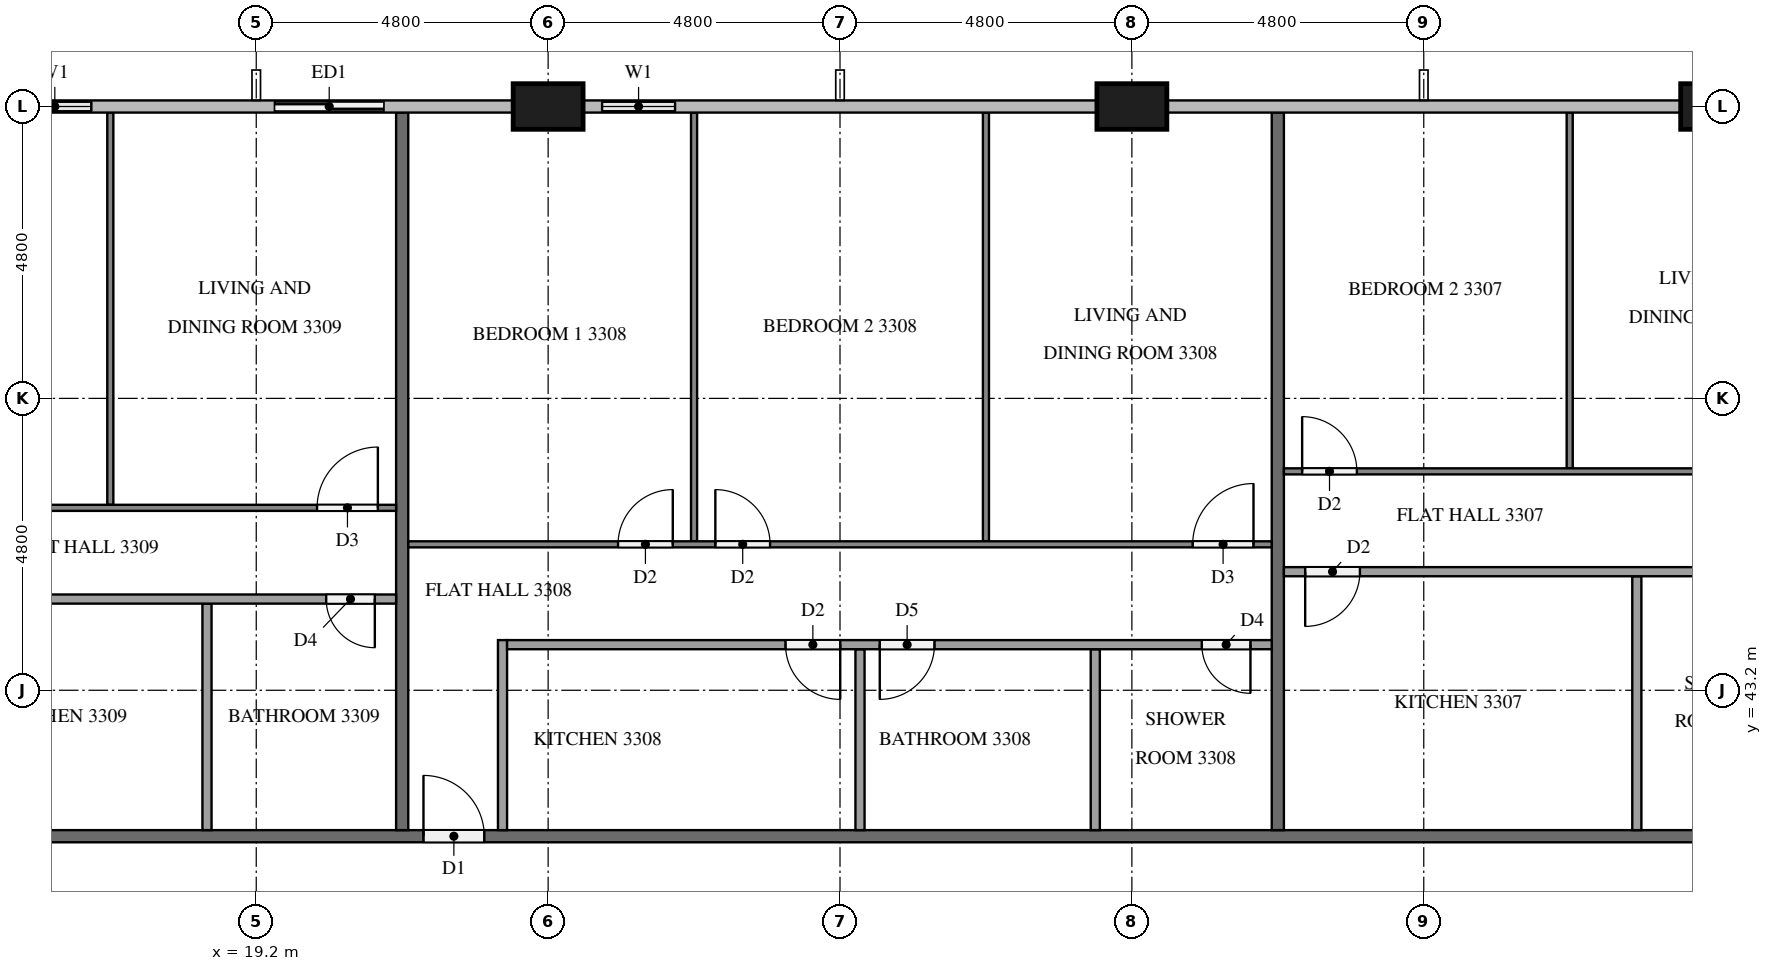
"""IFC4 building model, lengths in metres.
Left out: names, types, materials, properties, quantities, classifications, styles, units other than length and angle.
Written with IfcOpenShell. Run it as: python <this file> out.ifc"""

import sys

from ifc_helpers import new_model, si_unit, direction, frame, frame_2d, origin, origin_2d, place, context, subcontext, project, spatial, rectangle, extrude, element, fill, save


model = new_model("IFC4")
c1 = context("Model", 3, precision=1e-05, world=origin(), true_north=direction((0.0, 1.0)))
c2 = subcontext(c1, "Body", "Model", "MODEL_VIEW")
j1 = project(units=[si_unit("LENGTHUNIT", "METRE"), si_unit("PLANEANGLEUNIT", "RADIAN")], contexts=[c1])
p1 = place(None, origin())
s1 = spatial("IfcSite", under=j1, at=p1, CompositionType="ELEMENT")
p2 = place(p1, origin())
s2 = spatial("IfcBuilding", under=s1, at=p2, CompositionType="ELEMENT")
p3 = place(p2, frame((0.0, 0.0, 129.6)))
s3 = spatial("IfcBuildingStorey", under=s2, at=p3, CompositionType="ELEMENT", Elevation=129.6)
for number, where, z_axis, x_axis in (
    (1, (43.2, 52.8, 0.0), (0.0, 0.0, 1.0), (1.0, 0.0, 0.0)),
    (2, (33.6, 52.8, 0.0), (0.0, 0.0, 1.0), (1.0, 0.0, 0.0)),
    (3, (24.0, 52.8, 0.0), (0.0, 0.0, 1.0), (1.0, 0.0, 0.0)),
):
    element("IfcColumn", number, at=place(p3, frame(where, z_axis=z_axis, x_axis=x_axis)), inside=s3, PredefinedType="COLUMN", context=c2, shape_type="SweptSolid", body=[
        extrude(rectangle(XDim=1.15, YDim=0.75, at=origin_2d()), origin(), (0.0, 0.0, 1.0), 3.2),
    ])
p4 = place(p3, frame((26.4, 52.8, 0.0), z_axis=(0.0, 0.0, 1.0), x_axis=(-1.0, 0.0, 0.0)))
e4 = element("IfcWall", 4, at=p4, inside=s3, PredefinedType="SOLIDWALL", context=c2, shape_type="SweptSolid", body=[
    extrude(rectangle(XDim=1.825, YDim=0.15, at=frame_2d((0.913, 0.0))), origin(), (0.0, 0.0, 1.0), 3.2),
])
p5 = place(p4, frame((0.312, 0.0, 0.9)))
e5 = element("IfcOpeningElement", 5, at=p5, cuts=e4, PredefinedType="OPENING", context=c2, shape_type="SweptSolid", body=[
    extrude(rectangle(XDim=1.2, YDim=1.4, at=frame_2d((0.6, 0.7))), frame((0.0, 0.085, 0.0), z_axis=(0.0, -1.0, 0.0), x_axis=(1.0, 0.0, 0.0)), (0.0, 0.0, 1.0), 0.17),
])
p6 = place(p3, frame((21.6, 52.8, 0.0), z_axis=(0.0, 0.0, 1.0), x_axis=(-1.0, 0.0, 0.0)))
e6 = element("IfcWall", 6, at=p6, inside=s3, PredefinedType="SOLIDWALL", context=c2, shape_type="SweptSolid", body=[
    extrude(rectangle(XDim=2.4, YDim=0.15, at=frame_2d((1.2, 0.0))), origin(), (0.0, 0.0, 1.0), 3.2),
])
p7 = place(p6, frame((0.3, 0.0, 0.0)))
e7 = element("IfcOpeningElement", 7, at=p7, cuts=e6, PredefinedType="OPENING", context=c2, shape_type="SweptSolid", body=[
    extrude(rectangle(XDim=1.8, YDim=2.4, at=frame_2d((0.9, 1.2))), frame((0.0, 0.085, 0.0), z_axis=(0.0, -1.0, 0.0), x_axis=(1.0, 0.0, 0.0)), (0.0, 0.0, 1.0), 0.17),
])
p8 = place(p3, frame((16.8, 52.8, 0.0), z_axis=(0.0, 0.0, 1.0), x_axis=(-1.0, 0.0, 0.0)))
e8 = element("IfcWall", 8, at=p8, inside=s3, PredefinedType="SOLIDWALL", context=c2, shape_type="SweptSolid", body=[
    extrude(rectangle(XDim=1.825, YDim=0.15, at=frame_2d((0.913, 0.0))), origin(), (0.0, 0.0, 1.0), 3.2),
])
p9 = place(p8, frame((0.312, 0.0, 0.9)))
e9 = element("IfcOpeningElement", 9, at=p9, cuts=e8, PredefinedType="OPENING", context=c2, shape_type="SweptSolid", body=[
    extrude(rectangle(XDim=1.2, YDim=1.4, at=frame_2d((0.6, 0.7))), frame((0.0, 0.085, 0.0), z_axis=(0.0, -1.0, 0.0), x_axis=(1.0, 0.0, 0.0)), (0.0, 0.0, 1.0), 0.17),
])
p10 = place(p3, frame((11.9, 40.8, 0.0), z_axis=(0.0, 0.0, 1.0), x_axis=(1.0, 0.0, 0.0)))
e10 = element("IfcWall", 10, at=p10, inside=s3, PredefinedType="PARTITIONING", context=c2, shape_type="SweptSolid", body=[
    extrude(rectangle(XDim=38.6, YDim=0.2, at=frame_2d((19.3, 0.0))), origin(), (0.0, 0.0, 1.0), 3.2),
])
p11 = place(p10, frame((37.15, 0.0, 0.0)))
e11 = element("IfcOpeningElement", 11, at=p11, cuts=e10, PredefinedType="OPENING", context=c2, shape_type="SweptSolid", body=[
    extrude(rectangle(XDim=1.0, YDim=2.1, at=frame_2d((0.5, 1.05))), frame((0.0, 0.11, 0.0), z_axis=(0.0, -1.0, 0.0), x_axis=(1.0, 0.0, 0.0)), (0.0, 0.0, 1.0), 0.22),
])
p12 = place(p10, frame((10.05, 0.0, 0.0)))
e12 = element("IfcOpeningElement", 12, at=p12, cuts=e10, PredefinedType="OPENING", context=c2, shape_type="SweptSolid", body=[
    extrude(rectangle(XDim=1.0, YDim=2.1, at=frame_2d((0.5, 1.05))), frame((0.0, 0.11, 0.0), z_axis=(0.0, -1.0, 0.0), x_axis=(1.0, 0.0, 0.0)), (0.0, 0.0, 1.0), 0.22),
])
p13 = place(p10, frame((0.45, 0.0, 0.0)))
e13 = element("IfcOpeningElement", 13, at=p13, cuts=e10, PredefinedType="OPENING", context=c2, shape_type="SweptSolid", body=[
    extrude(rectangle(XDim=1.0, YDim=2.1, at=frame_2d((0.5, 1.05))), frame((0.0, 0.11, 0.0), z_axis=(0.0, -1.0, 0.0), x_axis=(1.0, 0.0, 0.0)), (0.0, 0.0, 1.0), 0.22),
])
for number, where, z_axis, x_axis in (
    (14, (36.0, 52.7, 0.0), (0.0, 0.0, 1.0), (0.0, -1.0, 0.0)),
    (15, (21.6, 52.7, 0.0), (0.0, 0.0, 1.0), (0.0, -1.0, 0.0)),
):
    element("IfcWall", number, at=place(p3, frame(where, z_axis=z_axis, x_axis=x_axis)), inside=s3, PredefinedType="PARTITIONING", context=c2, shape_type="SweptSolid", body=[
        extrude(rectangle(XDim=11.8, YDim=0.2, at=frame_2d((5.9, 0.0))), origin(), (0.0, 0.0, 1.0), 3.2),
    ])
p14 = place(p3, frame((40.8, 46.85, 0.0), z_axis=(0.0, 0.0, 1.0), x_axis=(0.0, 1.0, 0.0)))
e16 = element("IfcWall", 16, at=p14, inside=s3, PredefinedType="PARTITIONING", context=c2, shape_type="SweptSolid", body=[
    extrude(rectangle(XDim=5.85, YDim=0.1, at=frame_2d((2.925, 0.0))), origin(), (0.0, 0.0, 1.0), 3.2),
])
p15 = place(p3, frame((36.1, 46.8, 0.0), z_axis=(0.0, 0.0, 1.0), x_axis=(1.0, 0.0, 0.0)))
e17 = element("IfcWall", 17, at=p15, inside=s3, PredefinedType="PARTITIONING", context=c2, shape_type="SweptSolid", body=[
    extrude(rectangle(XDim=14.2, YDim=0.1, at=frame_2d((7.1, 0.0))), origin(), (0.0, 0.0, 1.0), 3.2),
])
p16 = place(p15, frame((9.85, 0.0, 0.0)))
e18 = element("IfcOpeningElement", 18, at=p16, cuts=e17, PredefinedType="OPENING", context=c2, shape_type="SweptSolid", body=[
    extrude(rectangle(XDim=0.9, YDim=2.1, at=frame_2d((0.45, 1.05))), frame((0.0, 0.06, 0.0), z_axis=(0.0, -1.0, 0.0), x_axis=(1.0, 0.0, 0.0)), (0.0, 0.0, 1.0), 0.12),
])
p17 = place(p15, frame((8.15, 0.0, 0.0)))
e19 = element("IfcOpeningElement", 19, at=p17, cuts=e17, PredefinedType="OPENING", context=c2, shape_type="SweptSolid", body=[
    extrude(rectangle(XDim=1.0, YDim=2.1, at=frame_2d((0.5, 1.05))), frame((0.0, 0.06, 0.0), z_axis=(0.0, -1.0, 0.0), x_axis=(1.0, 0.0, 0.0)), (0.0, 0.0, 1.0), 0.12),
])
p18 = place(p15, frame((0.3, 0.0, 0.0)))
e20 = element("IfcOpeningElement", 20, at=p18, cuts=e17, PredefinedType="OPENING", context=c2, shape_type="SweptSolid", body=[
    extrude(rectangle(XDim=0.9, YDim=2.1, at=frame_2d((0.45, 1.05))), frame((0.0, 0.06, 0.0), z_axis=(0.0, -1.0, 0.0), x_axis=(1.0, 0.0, 0.0)), (0.0, 0.0, 1.0), 0.12),
])
p19 = place(p3, frame((41.904, 40.9, 0.0), z_axis=(0.0, 0.0, 1.0), x_axis=(0.0, 1.0, 0.0)))
e21 = element("IfcWall", 21, at=p19, inside=s3, PredefinedType="PARTITIONING", context=c2, shape_type="SweptSolid", body=[
    extrude(rectangle(XDim=4.175, YDim=0.15, at=frame_2d((2.087, 0.0))), origin(), (0.0, 0.0, 1.0), 3.2),
])
p20 = place(p3, frame((48.675, 45.15, 0.0), z_axis=(0.0, 0.0, 1.0), x_axis=(-1.0, 0.0, 0.0)))
e22 = element("IfcWall", 22, at=p20, inside=s3, PredefinedType="PARTITIONING", context=c2, shape_type="SweptSolid", body=[
    extrude(rectangle(XDim=12.575, YDim=0.15, at=frame_2d((6.288, 0.0))), origin(), (0.0, 0.0, 1.0), 3.2),
])
p21 = place(p20, frame((2.644, 0.0, 0.0)))
e23 = element("IfcOpeningElement", 23, at=p21, cuts=e22, PredefinedType="OPENING", context=c2, shape_type="SweptSolid", body=[
    extrude(rectangle(XDim=0.9, YDim=2.1, at=frame_2d((0.45, 1.05))), frame((0.0, 0.085, 0.0), z_axis=(0.0, -1.0, 0.0), x_axis=(1.0, 0.0, 0.0)), (0.0, 0.0, 1.0), 0.17),
])
p22 = place(p20, frame((4.194, 0.0, 0.0)))
e24 = element("IfcOpeningElement", 24, at=p22, cuts=e22, PredefinedType="OPENING", context=c2, shape_type="SweptSolid", body=[
    extrude(rectangle(XDim=0.8, YDim=2.1, at=frame_2d((0.4, 1.05))), frame((0.0, 0.085, 0.0), z_axis=(0.0, -1.0, 0.0), x_axis=(1.0, 0.0, 0.0)), (0.0, 0.0, 1.0), 0.17),
])
p23 = place(p20, frame((11.325, 0.0, 0.0)))
e25 = element("IfcOpeningElement", 25, at=p23, cuts=e22, PredefinedType="OPENING", context=c2, shape_type="SweptSolid", body=[
    extrude(rectangle(XDim=0.9, YDim=2.1, at=frame_2d((0.45, 1.05))), frame((0.0, 0.085, 0.0), z_axis=(0.0, -1.0, 0.0), x_axis=(1.0, 0.0, 0.0)), (0.0, 0.0, 1.0), 0.17),
])
for number, where, z_axis, x_axis in (
    (26, (26.4, 45.65, 0.0), (0.0, 0.0, 1.0), (0.0, 1.0, 0.0)),
    (27, (31.2, 45.65, 0.0), (0.0, 0.0, 1.0), (0.0, 1.0, 0.0)),
):
    element("IfcWall", number, at=place(p3, frame(where, z_axis=z_axis, x_axis=x_axis)), inside=s3, PredefinedType="PARTITIONING", context=c2, shape_type="SweptSolid", body=[
        extrude(rectangle(XDim=7.05, YDim=0.1, at=frame_2d((3.525, 0.0))), origin(), (0.0, 0.0, 1.0), 3.2),
    ])
p24 = place(p3, frame((21.7, 45.6, 0.0), z_axis=(0.0, 0.0, 1.0), x_axis=(1.0, 0.0, 0.0)))
e28 = element("IfcWall", 28, at=p24, inside=s3, PredefinedType="PARTITIONING", context=c2, shape_type="SweptSolid", body=[
    extrude(rectangle(XDim=14.2, YDim=0.1, at=frame_2d((7.1, 0.0))), origin(), (0.0, 0.0, 1.0), 3.2),
])
p25 = place(p24, frame((3.45, 0.0, 0.0)))
e29 = element("IfcOpeningElement", 29, at=p25, cuts=e28, PredefinedType="OPENING", context=c2, shape_type="SweptSolid", body=[
    extrude(rectangle(XDim=0.9, YDim=2.1, at=frame_2d((0.45, 1.05))), frame((0.0, 0.06, 0.0), z_axis=(0.0, -1.0, 0.0), x_axis=(1.0, 0.0, 0.0)), (0.0, 0.0, 1.0), 0.12),
])
p26 = place(p24, frame((5.05, 0.0, 0.0)))
e30 = element("IfcOpeningElement", 30, at=p26, cuts=e28, PredefinedType="OPENING", context=c2, shape_type="SweptSolid", body=[
    extrude(rectangle(XDim=0.9, YDim=2.1, at=frame_2d((0.45, 1.05))), frame((0.0, 0.06, 0.0), z_axis=(0.0, -1.0, 0.0), x_axis=(1.0, 0.0, 0.0)), (0.0, 0.0, 1.0), 0.12),
])
p27 = place(p24, frame((12.9, 0.0, 0.0)))
e31 = element("IfcOpeningElement", 31, at=p27, cuts=e28, PredefinedType="OPENING", context=c2, shape_type="SweptSolid", body=[
    extrude(rectangle(XDim=1.0, YDim=2.1, at=frame_2d((0.5, 1.05))), frame((0.0, 0.06, 0.0), z_axis=(0.0, -1.0, 0.0), x_axis=(1.0, 0.0, 0.0)), (0.0, 0.0, 1.0), 0.12),
])
for number, where, z_axis, x_axis in (
    (32, (29.129, 40.9, 0.0), (0.0, 0.0, 1.0), (0.0, 1.0, 0.0)),
    (33, (32.998, 40.9, 0.0), (0.0, 0.0, 1.0), (0.0, 1.0, 0.0)),
):
    element("IfcWall", number, at=place(p3, frame(where, z_axis=z_axis, x_axis=x_axis)), inside=s3, PredefinedType="PARTITIONING", context=c2, shape_type="SweptSolid", body=[
        extrude(rectangle(XDim=2.975, YDim=0.15, at=frame_2d((1.488, 0.0))), origin(), (0.0, 0.0, 1.0), 3.2),
    ])
p28 = place(p3, frame((23.25, 40.9, 0.0), z_axis=(0.0, 0.0, 1.0), x_axis=(0.0, 1.0, 0.0)))
e34 = element("IfcWall", 34, at=p28, inside=s3, PredefinedType="PARTITIONING", context=c2, shape_type="SweptSolid", body=[
    extrude(rectangle(XDim=3.125, YDim=0.15, at=frame_2d((1.562, 0.0))), origin(), (0.0, 0.0, 1.0), 3.2),
])
p29 = place(p3, frame((35.9, 43.95, 0.0), z_axis=(0.0, 0.0, 1.0), x_axis=(-1.0, 0.0, 0.0)))
e35 = element("IfcWall", 35, at=p29, inside=s3, PredefinedType="PARTITIONING", context=c2, shape_type="SweptSolid", body=[
    extrude(rectangle(XDim=12.575, YDim=0.15, at=frame_2d((6.288, 0.0))), origin(), (0.0, 0.0, 1.0), 3.2),
])
p30 = place(p29, frame((7.096, 0.0, 0.0)))
e36 = element("IfcOpeningElement", 36, at=p30, cuts=e35, PredefinedType="OPENING", context=c2, shape_type="SweptSolid", body=[
    extrude(rectangle(XDim=0.9, YDim=2.1, at=frame_2d((0.45, 1.05))), frame((0.0, 0.085, 0.0), z_axis=(0.0, -1.0, 0.0), x_axis=(1.0, 0.0, 0.0)), (0.0, 0.0, 1.0), 0.17),
])
p31 = place(p29, frame((5.546, 0.0, 0.0)))
e37 = element("IfcOpeningElement", 37, at=p31, cuts=e35, PredefinedType="OPENING", context=c2, shape_type="SweptSolid", body=[
    extrude(rectangle(XDim=0.9, YDim=2.1, at=frame_2d((0.45, 1.05))), frame((0.0, 0.085, 0.0), z_axis=(0.0, -1.0, 0.0), x_axis=(1.0, 0.0, 0.0)), (0.0, 0.0, 1.0), 0.17),
])
p32 = place(p29, frame((0.35, 0.0, 0.0)))
e38 = element("IfcOpeningElement", 38, at=p32, cuts=e35, PredefinedType="OPENING", context=c2, shape_type="SweptSolid", body=[
    extrude(rectangle(XDim=0.8, YDim=2.1, at=frame_2d((0.4, 1.05))), frame((0.0, 0.085, 0.0), z_axis=(0.0, -1.0, 0.0), x_axis=(1.0, 0.0, 0.0)), (0.0, 0.0, 1.0), 0.17),
])
p33 = place(p3, frame((16.8, 46.25, 0.0), z_axis=(0.0, 0.0, 1.0), x_axis=(0.0, 1.0, 0.0)))
e39 = element("IfcWall", 39, at=p33, inside=s3, PredefinedType="PARTITIONING", context=c2, shape_type="SweptSolid", body=[
    extrude(rectangle(XDim=6.45, YDim=0.1, at=frame_2d((3.225, 0.0))), origin(), (0.0, 0.0, 1.0), 3.2),
])
p34 = place(p3, frame((12.1, 46.2, 0.0), z_axis=(0.0, 0.0, 1.0), x_axis=(1.0, 0.0, 0.0)))
e40 = element("IfcWall", 40, at=p34, inside=s3, PredefinedType="PARTITIONING", context=c2, shape_type="SweptSolid", body=[
    extrude(rectangle(XDim=9.4, YDim=0.1, at=frame_2d((4.7, 0.0))), origin(), (0.0, 0.0, 1.0), 3.2),
])
p35 = place(p34, frame((0.3, 0.0, 0.0)))
e41 = element("IfcOpeningElement", 41, at=p35, cuts=e40, PredefinedType="OPENING", context=c2, shape_type="SweptSolid", body=[
    extrude(rectangle(XDim=0.9, YDim=2.1, at=frame_2d((0.45, 1.05))), frame((0.0, 0.06, 0.0), z_axis=(0.0, -1.0, 0.0), x_axis=(1.0, 0.0, 0.0)), (0.0, 0.0, 1.0), 0.12),
])
p36 = place(p34, frame((8.1, 0.0, 0.0)))
e42 = element("IfcOpeningElement", 42, at=p36, cuts=e40, PredefinedType="OPENING", context=c2, shape_type="SweptSolid", body=[
    extrude(rectangle(XDim=1.0, YDim=2.1, at=frame_2d((0.5, 1.05))), frame((0.0, 0.06, 0.0), z_axis=(0.0, -1.0, 0.0), x_axis=(1.0, 0.0, 0.0)), (0.0, 0.0, 1.0), 0.12),
])
p37 = place(p3, frame((18.39, 40.9, 0.0), z_axis=(0.0, 0.0, 1.0), x_axis=(0.0, 1.0, 0.0)))
e43 = element("IfcWall", 43, at=p37, inside=s3, PredefinedType="PARTITIONING", context=c2, shape_type="SweptSolid", body=[
    extrude(rectangle(XDim=3.725, YDim=0.15, at=frame_2d((1.863, 0.0))), origin(), (0.0, 0.0, 1.0), 3.2),
])
p38 = place(p3, frame((21.5, 44.7, 0.0), z_axis=(0.0, 0.0, 1.0), x_axis=(-1.0, 0.0, 0.0)))
e44 = element("IfcWall", 44, at=p38, inside=s3, PredefinedType="PARTITIONING", context=c2, shape_type="SweptSolid", body=[
    extrude(rectangle(XDim=7.775, YDim=0.15, at=frame_2d((3.887, 0.0))), origin(), (0.0, 0.0, 1.0), 3.2),
])
p39 = place(p38, frame((6.575, 0.0, 0.0)))
e45 = element("IfcOpeningElement", 45, at=p39, cuts=e44, PredefinedType="OPENING", context=c2, shape_type="SweptSolid", body=[
    extrude(rectangle(XDim=0.9, YDim=2.1, at=frame_2d((0.45, 1.05))), frame((0.0, 0.085, 0.0), z_axis=(0.0, -1.0, 0.0), x_axis=(1.0, 0.0, 0.0)), (0.0, 0.0, 1.0), 0.17),
])
p40 = place(p38, frame((0.35, 0.0, 0.0)))
e46 = element("IfcOpeningElement", 46, at=p40, cuts=e44, PredefinedType="OPENING", context=c2, shape_type="SweptSolid", body=[
    extrude(rectangle(XDim=0.8, YDim=2.1, at=frame_2d((0.4, 1.05))), frame((0.0, 0.085, 0.0), z_axis=(0.0, -1.0, 0.0), x_axis=(1.0, 0.0, 0.0)), (0.0, 0.0, 1.0), 0.17),
])
p41 = place(p5, origin())
e47 = element("IfcWindow", 47, at=p41, inside=s3, PartitioningType="SINGLE_PANEL", PredefinedType="WINDOW", context=c2, shape_type="SweptSolid", body=[
    extrude(rectangle(XDim=1.2, YDim=1.4, at=frame_2d((0.6, 0.7))), frame((0.0, 0.03, 0.0), z_axis=(0.0, -1.0, 0.0), x_axis=(1.0, 0.0, 0.0)), (0.0, 0.0, 1.0), 0.06),
])
fill(e5, e47)
p42 = place(p7, origin())
e48 = element("IfcDoor", 48, at=p42, inside=s3, OperationType="SLIDING_TO_RIGHT", PredefinedType="DOOR", context=c2, shape_type="SweptSolid", body=[
    extrude(rectangle(XDim=1.8, YDim=2.4, at=frame_2d((0.9, 1.2))), frame((0.0, 0.025, 0.0), z_axis=(0.0, -1.0, 0.0), x_axis=(1.0, 0.0, 0.0)), (0.0, 0.0, 1.0), 0.05),
])
fill(e7, e48)
p43 = place(p9, origin())
e49 = element("IfcWindow", 49, at=p43, inside=s3, PartitioningType="SINGLE_PANEL", PredefinedType="WINDOW", context=c2, shape_type="SweptSolid", body=[
    extrude(rectangle(XDim=1.2, YDim=1.4, at=frame_2d((0.6, 0.7))), frame((0.0, 0.03, 0.0), z_axis=(0.0, -1.0, 0.0), x_axis=(1.0, 0.0, 0.0)), (0.0, 0.0, 1.0), 0.06),
])
fill(e9, e49)
p44 = place(p12, origin())
e50 = element("IfcDoor", 50, at=p44, inside=s3, OperationType="SINGLE_SWING_LEFT", PredefinedType="DOOR", context=c2, shape_type="SweptSolid", body=[
    extrude(rectangle(XDim=1.0, YDim=2.1, at=frame_2d((0.5, 1.05))), frame((0.0, 0.025, 0.0), z_axis=(0.0, -1.0, 0.0), x_axis=(1.0, 0.0, 0.0)), (0.0, 0.0, 1.0), 0.05),
])
fill(e12, e50)
p45 = place(p18, origin())
e51 = element("IfcDoor", 51, at=p45, inside=s3, OperationType="SINGLE_SWING_LEFT", PredefinedType="DOOR", context=c2, shape_type="SweptSolid", body=[
    extrude(rectangle(XDim=0.9, YDim=2.1, at=frame_2d((0.45, 1.05))), frame((0.0, 0.025, 0.0), z_axis=(0.0, -1.0, 0.0), x_axis=(1.0, 0.0, 0.0)), (0.0, 0.0, 1.0), 0.05),
])
fill(e20, e51)
p46 = place(p23, origin())
e52 = element("IfcDoor", 52, at=p46, inside=s3, OperationType="SINGLE_SWING_RIGHT", PredefinedType="DOOR", context=c2, shape_type="SweptSolid", body=[
    extrude(rectangle(XDim=0.9, YDim=2.1, at=frame_2d((0.45, 1.05))), frame((0.0, 0.025, 0.0), z_axis=(0.0, -1.0, 0.0), x_axis=(1.0, 0.0, 0.0)), (0.0, 0.0, 1.0), 0.05),
])
fill(e25, e52)
p47 = place(p25, origin())
e53 = element("IfcDoor", 53, at=p47, inside=s3, OperationType="SINGLE_SWING_RIGHT", PredefinedType="DOOR", context=c2, shape_type="SweptSolid", body=[
    extrude(rectangle(XDim=0.9, YDim=2.1, at=frame_2d((0.45, 1.05))), frame((0.0, 0.025, 0.0), z_axis=(0.0, -1.0, 0.0), x_axis=(1.0, 0.0, 0.0)), (0.0, 0.0, 1.0), 0.05),
])
fill(e29, e53)
p48 = place(p26, origin())
e54 = element("IfcDoor", 54, at=p48, inside=s3, OperationType="SINGLE_SWING_LEFT", PredefinedType="DOOR", context=c2, shape_type="SweptSolid", body=[
    extrude(rectangle(XDim=0.9, YDim=2.1, at=frame_2d((0.45, 1.05))), frame((0.0, 0.025, 0.0), z_axis=(0.0, -1.0, 0.0), x_axis=(1.0, 0.0, 0.0)), (0.0, 0.0, 1.0), 0.05),
])
fill(e30, e54)
p49 = place(p27, origin())
e55 = element("IfcDoor", 55, at=p49, inside=s3, OperationType="SINGLE_SWING_RIGHT", PredefinedType="DOOR", context=c2, shape_type="SweptSolid", body=[
    extrude(rectangle(XDim=1.0, YDim=2.1, at=frame_2d((0.5, 1.05))), frame((0.0, 0.025, 0.0), z_axis=(0.0, -1.0, 0.0), x_axis=(1.0, 0.0, 0.0)), (0.0, 0.0, 1.0), 0.05),
])
fill(e31, e55)
p50 = place(p30, origin())
e56 = element("IfcDoor", 56, at=p50, inside=s3, OperationType="SINGLE_SWING_LEFT", PredefinedType="DOOR", context=c2, shape_type="SweptSolid", body=[
    extrude(rectangle(XDim=0.9, YDim=2.1, at=frame_2d((0.45, 1.05))), frame((0.0, 0.025, 0.0), z_axis=(0.0, -1.0, 0.0), x_axis=(1.0, 0.0, 0.0)), (0.0, 0.0, 1.0), 0.05),
])
fill(e36, e56)
p51 = place(p31, origin())
e57 = element("IfcDoor", 57, at=p51, inside=s3, OperationType="SINGLE_SWING_RIGHT", PredefinedType="DOOR", context=c2, shape_type="SweptSolid", body=[
    extrude(rectangle(XDim=0.9, YDim=2.1, at=frame_2d((0.45, 1.05))), frame((0.0, 0.025, 0.0), z_axis=(0.0, -1.0, 0.0), x_axis=(1.0, 0.0, 0.0)), (0.0, 0.0, 1.0), 0.05),
])
fill(e37, e57)
p52 = place(p32, origin())
e58 = element("IfcDoor", 58, at=p52, inside=s3, OperationType="SINGLE_SWING_LEFT", PredefinedType="DOOR", context=c2, shape_type="SweptSolid", body=[
    extrude(rectangle(XDim=0.8, YDim=2.1, at=frame_2d((0.4, 1.05))), frame((0.0, 0.025, 0.0), z_axis=(0.0, -1.0, 0.0), x_axis=(1.0, 0.0, 0.0)), (0.0, 0.0, 1.0), 0.05),
])
fill(e38, e58)
p53 = place(p36, origin())
e59 = element("IfcDoor", 59, at=p53, inside=s3, OperationType="SINGLE_SWING_RIGHT", PredefinedType="DOOR", context=c2, shape_type="SweptSolid", body=[
    extrude(rectangle(XDim=1.0, YDim=2.1, at=frame_2d((0.5, 1.05))), frame((0.0, 0.025, 0.0), z_axis=(0.0, -1.0, 0.0), x_axis=(1.0, 0.0, 0.0)), (0.0, 0.0, 1.0), 0.05),
])
fill(e42, e59)
p54 = place(p40, origin())
e60 = element("IfcDoor", 60, at=p54, inside=s3, OperationType="SINGLE_SWING_LEFT", PredefinedType="DOOR", context=c2, shape_type="SweptSolid", body=[
    extrude(rectangle(XDim=0.8, YDim=2.1, at=frame_2d((0.4, 1.05))), frame((0.0, 0.025, 0.0), z_axis=(0.0, -1.0, 0.0), x_axis=(1.0, 0.0, 0.0)), (0.0, 0.0, 1.0), 0.05),
])
fill(e46, e60)
save(model, sys.argv[1])
